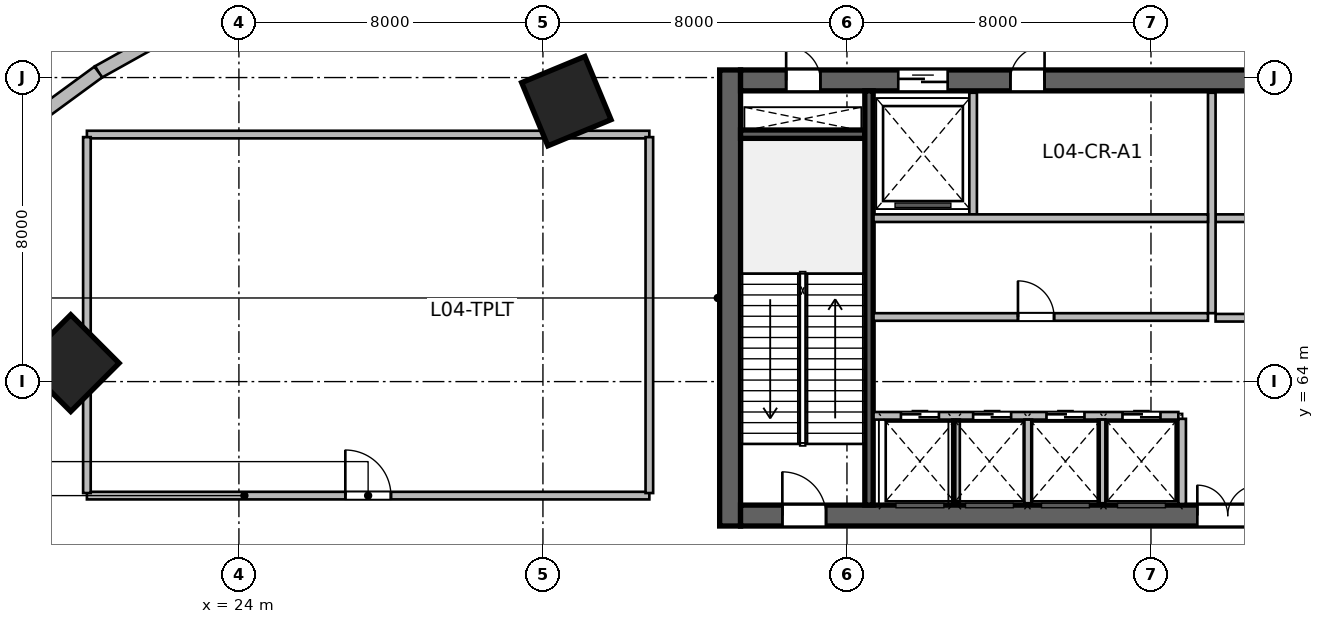
"""IFC4 building model, lengths in metres.
Left out: names, types, materials, properties, quantities, classifications, styles, units other than length and angle.
Written with IfcOpenShell. Run it as: python <this file> out.ifc"""

import sys

from ifc_helpers import new_model, si_unit, direction, frame, frame_2d, origin, origin_2d, place, context, subcontext, project, spatial, rectangle, extrude, source, transform, mapped, element, fill, save


model = new_model("IFC4")
c1 = context("Model", 3, precision=1e-05, world=origin(), true_north=direction((0.0, 1.0)))
c2 = subcontext(c1, "Body", "Model", "MODEL_VIEW")
j1 = project(units=[si_unit("LENGTHUNIT", "METRE"), si_unit("PLANEANGLEUNIT", "RADIAN")], contexts=[c1])
p1 = place(None, origin())
s1 = spatial("IfcSite", under=j1, at=p1, CompositionType="ELEMENT")
p2 = place(p1, origin())
s2 = spatial("IfcBuilding", under=s1, at=p2, CompositionType="ELEMENT")
p3 = place(p2, frame((0.0, 0.0, 24.0)))
s3 = spatial("IfcBuildingStorey", under=s2, at=p3, CompositionType="ELEMENT", Elevation=24.0)
m1 = source(origin(), c2, "Body", "SweptSolid", [
    extrude(rectangle(XDim=12.0, YDim=0.55, at=frame_2d((6.0, 0.0))), origin(), (0.0, 0.0, 1.0), 6.0),
])
p4 = place(p3, frame((36.925, 60.2, 0.0), z_axis=(0.0, 0.0, 1.0), x_axis=(0.0, 1.0, 0.0)))
e1 = element("IfcWall", 1, at=p4, inside=s3, PredefinedType="SHEAR", context=c2, shape_type="MappedRepresentation", body=[
    mapped(m1, transform((0.0, 0.0, 0.0), scale=1.0)),
])
m2 = source(origin(), c2, "Body", "SweptSolid", [
    extrude(rectangle(XDim=21.6, YDim=0.55, at=frame_2d((10.8, 0.0))), origin(), (0.0, 0.0, 1.0), 6.0),
])
p5 = place(p3, frame((37.2, 60.475, 0.0), z_axis=(0.0, 0.0, 1.0), x_axis=(1.0, 0.0, 0.0)))
e2 = element("IfcWall", 2, at=p5, inside=s3, PredefinedType="SHEAR", context=c2, shape_type="MappedRepresentation", body=[
    mapped(m2, transform((0.0, 0.0, 0.0), scale=1.0)),
])
p6 = place(p5, frame((1.1, 0.0, 0.0)))
e3 = element("IfcOpeningElement", 3, at=p6, cuts=e2, PredefinedType="OPENING", context=c2, shape_type="SweptSolid", body=[
    extrude(rectangle(XDim=1.15, YDim=2.15, at=frame_2d((0.575, 1.075))), frame((0.0, 0.285, 0.0), z_axis=(0.0, -1.0, 0.0), x_axis=(1.0, 0.0, 0.0)), (0.0, 0.0, 1.0), 0.57),
])
p7 = place(p5, frame((19.5, 0.0, 0.0)))
e4 = element("IfcOpeningElement", 4, at=p7, cuts=e2, PredefinedType="OPENING", context=c2, shape_type="SweptSolid", body=[
    extrude(rectangle(XDim=0.9, YDim=2.1, at=frame_2d((0.45, 1.05))), frame((0.0, 0.285, 0.0), z_axis=(0.0, -1.0, 0.0), x_axis=(1.0, 0.0, 0.0)), (0.0, 0.0, 1.0), 0.57),
])
p8 = place(p5, frame((12.02, 0.0, 0.0)))
e5 = element("IfcOpeningElement", 5, at=p8, cuts=e2, PredefinedType="OPENING", context=c2, shape_type="SweptSolid", body=[
    extrude(rectangle(XDim=1.6, YDim=2.15, at=frame_2d((0.8, 1.075))), frame((0.0, 0.285, 0.0), z_axis=(0.0, -1.0, 0.0), x_axis=(1.0, 0.0, 0.0)), (0.0, 0.0, 1.0), 0.57),
])
p9 = place(p3, frame((37.2, 71.925, 0.0), z_axis=(0.0, 0.0, 1.0), x_axis=(1.0, 0.0, 0.0)))
e6 = element("IfcWall", 6, at=p9, inside=s3, PredefinedType="SHEAR", context=c2, shape_type="MappedRepresentation", body=[
    mapped(m2, transform((0.0, 0.0, 0.0), scale=1.0)),
])
p10 = place(p9, frame((1.2, 0.0, 0.0)))
e7 = element("IfcOpeningElement", 7, at=p10, cuts=e6, PredefinedType="OPENING", context=c2, shape_type="SweptSolid", body=[
    extrude(rectangle(XDim=0.9, YDim=2.1, at=frame_2d((0.45, 1.05))), frame((0.0, 0.285, 0.0), z_axis=(0.0, -1.0, 0.0), x_axis=(1.0, 0.0, 0.0)), (0.0, 0.0, 1.0), 0.57),
])
p11 = place(p9, frame((14.7, 0.0, 0.0)))
e8 = element("IfcOpeningElement", 8, at=p11, cuts=e6, PredefinedType="OPENING", context=c2, shape_type="SweptSolid", body=[
    extrude(rectangle(XDim=1.2, YDim=2.15, at=frame_2d((0.6, 1.075))), frame((0.0, 0.285, 0.0), z_axis=(0.0, -1.0, 0.0), x_axis=(1.0, 0.0, 0.0)), (0.0, 0.0, 1.0), 0.57),
])
p12 = place(p9, frame((4.15, 0.0, 0.0)))
e9 = element("IfcOpeningElement", 9, at=p12, cuts=e6, PredefinedType="OPENING", context=c2, shape_type="SweptSolid", body=[
    extrude(rectangle(XDim=1.3, YDim=2.15, at=frame_2d((0.65, 1.075))), frame((0.0, 0.285, 0.0), z_axis=(0.0, -1.0, 0.0), x_axis=(1.0, 0.0, 0.0)), (0.0, 0.0, 1.0), 0.57),
])
p13 = place(p9, frame((7.1, 0.0, 0.0)))
e10 = element("IfcOpeningElement", 10, at=p13, cuts=e6, PredefinedType="OPENING", context=c2, shape_type="SweptSolid", body=[
    extrude(rectangle(XDim=0.9, YDim=2.1, at=frame_2d((0.45, 1.05))), frame((0.0, 0.285, 0.0), z_axis=(0.0, -1.0, 0.0), x_axis=(1.0, 0.0, 0.0)), (0.0, 0.0, 1.0), 0.57),
])
m3 = source(origin(), c2, "Body", "SweptSolid", [
    extrude(rectangle(XDim=3.27, YDim=0.22, at=frame_2d((1.635, 0.0))), origin(), (0.0, 0.0, 1.0), 6.0),
])
p14 = place(p3, frame((37.2, 70.51, 0.0), z_axis=(0.0, 0.0, 1.0), x_axis=(1.0, 0.0, 0.0)))
e11 = element("IfcWall", 11, at=p14, inside=s3, PredefinedType="SHEAR", context=c2, shape_type="MappedRepresentation", body=[
    mapped(m3, transform((0.0, 0.0, 0.0), scale=1.0)),
])
m4 = source(origin(), c2, "Body", "SweptSolid", [
    extrude(rectangle(XDim=10.9, YDim=0.22, at=frame_2d((5.45, 0.0))), origin(), (0.0, 0.0, 1.0), 6.0),
])
p15 = place(p3, frame((40.58, 60.75, 0.0), z_axis=(0.0, 0.0, 1.0), x_axis=(0.0, 1.0, 0.0)))
e12 = element("IfcWall", 12, at=p15, inside=s3, PredefinedType="SHEAR", context=c2, shape_type="MappedRepresentation", body=[
    mapped(m4, transform((0.0, 0.0, 0.0), scale=1.0)),
])
m5 = source(origin(), c2, "Body", "SweptSolid", [
    extrude(rectangle(XDim=1.8, YDim=1.8, at=origin_2d()), origin(), (0.0, 0.0, 1.0), 6.0),
])
for number, where, z_axis, x_axis in (
    (13, (32.616, 71.379, 0.0), (0.0, 0.0, 1.0), (-0.383, 0.924, 0.0)),
    (14, (19.574, 64.486, 0.0), (0.0, 0.0, 1.0), (-0.707, 0.707, 0.0)),
):
    element("IfcColumn", number, at=place(p3, frame(where, z_axis=z_axis, x_axis=x_axis)), inside=s3, PredefinedType="COLUMN", context=c2, shape_type="MappedRepresentation", body=[
        mapped(m5, transform((0.0, 0.0, 0.0), scale=1.0)),
    ])
m6 = source(origin(), c2, "Body", "SweptSolid", [
    extrude(rectangle(XDim=5.667, YDim=0.35, at=frame_2d((2.833, 0.0))), origin(), (0.0, 0.0, 1.0), 5.55),
])
p16 = place(p3, frame((25.25, 74.909, 0.0), z_axis=(0.0, 0.0, 1.0), x_axis=(-0.873233089296, -0.487302751642, 0.0)))
e15 = element("IfcWall", 15, at=p16, inside=s3, PredefinedType="SOLIDWALL", context=c2, shape_type="MappedRepresentation", body=[
    mapped(m6, transform((0.0, 0.0, 0.0), scale=1.0)),
])
p17 = place(p16, frame((1.634, 0.0, 1.05)))
e16 = element("IfcOpeningElement", 16, at=p17, cuts=e15, PredefinedType="OPENING", context=c2, shape_type="SweptSolid", body=[
    extrude(rectangle(XDim=2.4, YDim=2.4, at=frame_2d((1.2, 1.2))), frame((0.0, 0.185, 0.0), z_axis=(0.0, -1.0, 0.0), x_axis=(1.0, 0.0, 0.0)), (0.0, 0.0, 1.0), 0.37),
])
m7 = source(origin(), c2, "Body", "SweptSolid", [
    extrude(rectangle(XDim=5.547, YDim=0.35, at=frame_2d((2.773, 0.0))), origin(), (0.0, 0.0, 1.0), 5.55),
])
p18 = place(p3, frame((20.302, 72.147, 0.0), z_axis=(0.0, 0.0, 1.0), x_axis=(-0.806767275837, -0.590869327887, 0.0)))
e17 = element("IfcWall", 17, at=p18, inside=s3, PredefinedType="SOLIDWALL", context=c2, shape_type="MappedRepresentation", body=[
    mapped(m7, transform((0.0, 0.0, 0.0), scale=1.0)),
])
m8 = source(origin(), c2, "Body", "SweptSolid", [
    extrude(rectangle(XDim=2.24, YDim=0.2, at=frame_2d((1.12, 0.0))), origin(), (0.0, 0.0, 1.0), 5.55),
])
p19 = place(p3, frame((48.82, 60.78, 0.0), z_axis=(0.0, 0.0, 1.0), x_axis=(0.0, 1.0, 0.0)))
e18 = element("IfcWall", 18, at=p19, inside=s3, PredefinedType="SOLIDWALL", context=c2, shape_type="MappedRepresentation", body=[
    mapped(m8, transform((0.0, 0.0, 0.0), scale=1.0)),
])
m9 = source(origin(), c2, "Body", "SweptSolid", [
    extrude(rectangle(XDim=5.62, YDim=0.2, at=frame_2d((2.81, 0.0))), origin(), (0.0, 0.0, 1.0), 5.55),
])
p20 = place(p3, frame((49.7, 68.3, 0.0), z_axis=(0.0, 0.0, 1.0), x_axis=(1.0, 0.0, 0.0)))
e19 = element("IfcWall", 19, at=p20, inside=s3, PredefinedType="SOLIDWALL", context=c2, shape_type="MappedRepresentation", body=[
    mapped(m9, transform((0.0, 0.0, 0.0), scale=1.0)),
])
p21 = place(p20, frame((1.6, 0.0, 0.0)))
e20 = element("IfcOpeningElement", 20, at=p21, cuts=e19, PredefinedType="OPENING", context=c2, shape_type="SweptSolid", body=[
    extrude(rectangle(XDim=1.1, YDim=2.15, at=frame_2d((0.55, 1.075))), frame((0.0, 0.11, 0.0), z_axis=(0.0, -1.0, 0.0), x_axis=(1.0, 0.0, 0.0)), (0.0, 0.0, 1.0), 0.22),
])
p22 = place(p20, frame((3.7, 0.0, 0.0)))
e21 = element("IfcOpeningElement", 21, at=p22, cuts=e19, PredefinedType="OPENING", context=c2, shape_type="SweptSolid", body=[
    extrude(rectangle(XDim=1.1, YDim=2.15, at=frame_2d((0.55, 1.075))), frame((0.0, 0.11, 0.0), z_axis=(0.0, -1.0, 0.0), x_axis=(1.0, 0.0, 0.0)), (0.0, 0.0, 1.0), 0.22),
])
m10 = source(origin(), c2, "Body", "SweptSolid", [
    extrude(rectangle(XDim=5.8, YDim=0.2, at=frame_2d((2.9, 0.0))), origin(), (0.0, 0.0, 1.0), 5.55),
])
p23 = place(p3, frame((49.6, 65.8, 0.0), z_axis=(0.0, 0.0, 1.0), x_axis=(0.0, 1.0, 0.0)))
e22 = element("IfcWall", 22, at=p23, inside=s3, PredefinedType="SOLIDWALL", context=c2, shape_type="MappedRepresentation", body=[
    mapped(m10, transform((0.0, 0.0, 0.0), scale=1.0)),
])
p24 = place(p3, frame((49.7, 65.68, 0.0), z_axis=(0.0, 0.0, 1.0), x_axis=(1.0, 0.0, 0.0)))
e23 = element("IfcWall", 23, at=p24, inside=s3, PredefinedType="SOLIDWALL", context=c2, shape_type="MappedRepresentation", body=[
    mapped(m9, transform((0.0, 0.0, 0.0), scale=1.0)),
])
m11 = source(origin(), c2, "Body", "SweptSolid", [
    extrude(rectangle(XDim=3.2, YDim=0.2, at=frame_2d((1.6, 0.0))), origin(), (0.0, 0.0, 1.0), 5.55),
])
p25 = place(p3, frame((43.32, 68.4, 0.0), z_axis=(0.0, 0.0, 1.0), x_axis=(0.0, 1.0, 0.0)))
e24 = element("IfcWall", 24, at=p25, inside=s3, PredefinedType="SOLIDWALL", context=c2, shape_type="MappedRepresentation", body=[
    mapped(m11, transform((0.0, 0.0, 0.0), scale=1.0)),
])
m12 = source(origin(), c2, "Body", "SweptSolid", [
    extrude(rectangle(XDim=8.8, YDim=0.2, at=frame_2d((4.4, 0.0))), origin(), (0.0, 0.0, 1.0), 5.55),
])
p26 = place(p3, frame((40.7, 68.3, 0.0), z_axis=(0.0, 0.0, 1.0), x_axis=(1.0, 0.0, 0.0)))
e25 = element("IfcWall", 25, at=p26, inside=s3, PredefinedType="SOLIDWALL", context=c2, shape_type="MappedRepresentation", body=[
    mapped(m12, transform((0.0, 0.0, 0.0), scale=1.0)),
])
m13 = source(origin(), c2, "Body", "SweptSolid", [
    extrude(rectangle(XDim=8.02, YDim=0.2, at=frame_2d((4.01, 0.0))), origin(), (0.0, 0.0, 1.0), 5.55),
])
p27 = place(p3, frame((40.7, 63.1, 0.0), z_axis=(0.0, 0.0, 1.0), x_axis=(1.0, 0.0, 0.0)))
e26 = element("IfcWall", 26, at=p27, inside=s3, PredefinedType="SOLIDWALL", context=c2, shape_type="MappedRepresentation", body=[
    mapped(m13, transform((0.0, 0.0, 0.0), scale=1.0)),
])
p28 = place(p27, frame((0.72, 0.0, 0.0)))
e27 = element("IfcOpeningElement", 27, at=p28, cuts=e26, PredefinedType="OPENING", context=c2, shape_type="SweptSolid", body=[
    extrude(rectangle(XDim=1.0, YDim=2.15, at=frame_2d((0.5, 1.075))), frame((0.0, 0.11, 0.0), z_axis=(0.0, -1.0, 0.0), x_axis=(1.0, 0.0, 0.0)), (0.0, 0.0, 1.0), 0.22),
])
p29 = place(p27, frame((2.62, 0.0, 0.0)))
e28 = element("IfcOpeningElement", 28, at=p29, cuts=e26, PredefinedType="OPENING", context=c2, shape_type="SweptSolid", body=[
    extrude(rectangle(XDim=1.0, YDim=2.15, at=frame_2d((0.5, 1.075))), frame((0.0, 0.11, 0.0), z_axis=(0.0, -1.0, 0.0), x_axis=(1.0, 0.0, 0.0)), (0.0, 0.0, 1.0), 0.22),
])
p30 = place(p27, frame((4.55, 0.0, 0.0)))
e29 = element("IfcOpeningElement", 29, at=p30, cuts=e26, PredefinedType="OPENING", context=c2, shape_type="SweptSolid", body=[
    extrude(rectangle(XDim=1.0, YDim=2.15, at=frame_2d((0.5, 1.075))), frame((0.0, 0.11, 0.0), z_axis=(0.0, -1.0, 0.0), x_axis=(1.0, 0.0, 0.0)), (0.0, 0.0, 1.0), 0.22),
])
p31 = place(p27, frame((6.55, 0.0, 0.0)))
e30 = element("IfcOpeningElement", 30, at=p31, cuts=e26, PredefinedType="OPENING", context=c2, shape_type="SweptSolid", body=[
    extrude(rectangle(XDim=1.0, YDim=2.15, at=frame_2d((0.5, 1.075))), frame((0.0, 0.11, 0.0), z_axis=(0.0, -1.0, 0.0), x_axis=(1.0, 0.0, 0.0)), (0.0, 0.0, 1.0), 0.22),
])
m14 = source(origin(), c2, "Body", "SweptSolid", [
    extrude(rectangle(XDim=2.2, YDim=0.2, at=frame_2d((1.1, 0.0))), origin(), (0.0, 0.0, 1.0), 5.55),
])
for number, where, z_axis, x_axis in (
    (31, (42.87, 60.8, 0.0), (0.0, 0.0, 1.0), (0.0, 1.0, 0.0)),
    (32, (44.77, 60.8, 0.0), (0.0, 0.0, 1.0), (0.0, 1.0, 0.0)),
    (33, (46.7, 60.8, 0.0), (0.0, 0.0, 1.0), (0.0, 1.0, 0.0)),
):
    element("IfcWall", number, at=place(p3, frame(where, z_axis=z_axis, x_axis=x_axis)), inside=s3, PredefinedType="SOLIDWALL", context=c2, shape_type="MappedRepresentation", body=[
        mapped(m14, transform((0.0, 0.0, 0.0), scale=1.0)),
    ])
p32 = place(p3, frame((40.7, 65.7, 0.0), z_axis=(0.0, 0.0, 1.0), x_axis=(1.0, 0.0, 0.0)))
e34 = element("IfcWall", 34, at=p32, inside=s3, PredefinedType="SOLIDWALL", context=c2, shape_type="MappedRepresentation", body=[
    mapped(m12, transform((0.0, 0.0, 0.0), scale=1.0)),
])
p33 = place(p32, frame((3.8, 0.0, 0.0)))
e35 = element("IfcOpeningElement", 35, at=p33, cuts=e34, PredefinedType="OPENING", context=c2, shape_type="SweptSolid", body=[
    extrude(rectangle(XDim=0.95, YDim=2.15, at=frame_2d((0.475, 1.075))), frame((0.0, 0.11, 0.0), z_axis=(0.0, -1.0, 0.0), x_axis=(1.0, 0.0, 0.0)), (0.0, 0.0, 1.0), 0.22),
])
m15 = source(origin(), c2, "Body", "SweptSolid", [
    extrude(rectangle(XDim=14.8, YDim=0.2, at=frame_2d((7.4, 0.0))), origin(), (0.0, 0.0, 1.0), 5.55),
])
p34 = place(p3, frame((20.0, 61.0, 0.0), z_axis=(0.0, 0.0, 1.0), x_axis=(1.0, 0.0, 0.0)))
e36 = element("IfcWall", 36, at=p34, inside=s3, PredefinedType="SOLIDWALL", context=c2, shape_type="MappedRepresentation", body=[
    mapped(m15, transform((0.0, 0.0, 0.0), scale=1.0)),
])
p35 = place(p34, frame((6.8, 0.0, 0.0)))
e37 = element("IfcOpeningElement", 37, at=p35, cuts=e36, PredefinedType="OPENING", context=c2, shape_type="SweptSolid", body=[
    extrude(rectangle(XDim=1.2, YDim=2.15, at=frame_2d((0.6, 1.075))), frame((0.0, 0.11, 0.0), z_axis=(0.0, -1.0, 0.0), x_axis=(1.0, 0.0, 0.0)), (0.0, 0.0, 1.0), 0.22),
])
m16 = source(origin(), c2, "Body", "SweptSolid", [
    extrude(rectangle(XDim=14.8, YDim=0.2, at=frame_2d((7.4, 0.0))), origin(), (0.0, 0.0, 1.0), 4.593),
])
p36 = place(p3, frame((20.0, 70.5, 0.0), z_axis=(0.0, 0.0, 1.0), x_axis=(1.0, 0.0, 0.0)))
e38 = element("IfcWall", 38, at=p36, inside=s3, PredefinedType="SOLIDWALL", context=c2, shape_type="MappedRepresentation", body=[
    mapped(m16, transform((0.0, 0.0, 0.0), scale=1.0)),
])
m17 = source(origin(), c2, "Body", "SweptSolid", [
    extrude(rectangle(XDim=9.365, YDim=0.2, at=frame_2d((4.683, 0.0))), origin(), (0.0, 0.0, 1.0), 2.66),
])
p37 = place(p3, frame((20.0, 61.067, 0.0), z_axis=(0.0, 0.0, 1.0), x_axis=(0.0, 1.0, 0.0)))
e39 = element("IfcWall", 39, at=p37, inside=s3, PredefinedType="SOLIDWALL", context=c2, shape_type="MappedRepresentation", body=[
    mapped(m17, transform((0.0, 0.0, 0.0), scale=1.0)),
])
m18 = source(origin(), c2, "Body", "SweptSolid", [
    extrude(rectangle(XDim=9.365, YDim=0.2, at=frame_2d((4.683, 0.0))), origin(), (0.0, 0.0, 1.0), 5.55),
])
p38 = place(p3, frame((34.8, 61.067, 0.0), z_axis=(0.0, 0.0, 1.0), x_axis=(0.0, 1.0, 0.0)))
e40 = element("IfcWall", 40, at=p38, inside=s3, PredefinedType="SOLIDWALL", context=c2, shape_type="MappedRepresentation", body=[
    mapped(m18, transform((0.0, 0.0, 0.0), scale=1.0)),
])
m19 = source(origin(), c2, "Body", "SweptSolid", [
    extrude(rectangle(XDim=1.15, YDim=2.15, at=frame_2d((0.575, 1.075))), frame((0.0, 0.025, 0.0), z_axis=(0.0, -1.0, 0.0), x_axis=(1.0, 0.0, 0.0)), (0.0, 0.0, 1.0), 0.05),
])
p39 = place(p6, origin())
e41 = element("IfcDoor", 41, at=p39, inside=s3, OperationType="SINGLE_SWING_LEFT", PredefinedType="DOOR", context=c2, shape_type="MappedRepresentation", body=[
    mapped(m19, transform((0.0, 0.0, 0.0), scale=1.0)),
])
fill(e3, e41)
m20 = source(origin(), c2, "Body", "SweptSolid", [
    extrude(rectangle(XDim=0.9, YDim=2.1, at=frame_2d((0.45, 1.05))), frame((0.0, 0.025, 0.0), z_axis=(0.0, -1.0, 0.0), x_axis=(1.0, 0.0, 0.0)), (0.0, 0.0, 1.0), 0.05),
])
p40 = place(p10, origin())
e42 = element("IfcDoor", 42, at=p40, inside=s3, OperationType="SINGLE_SWING_LEFT", PredefinedType="DOOR", context=c2, shape_type="MappedRepresentation", body=[
    mapped(m20, transform((0.0, 0.0, 0.0), scale=1.0)),
])
fill(e7, e42)
m21 = source(origin(), c2, "Body", "SweptSolid", [
    extrude(rectangle(XDim=1.6, YDim=2.15, at=frame_2d((0.8, 1.075))), frame((0.0, 0.025, 0.0), z_axis=(0.0, -1.0, 0.0), x_axis=(1.0, 0.0, 0.0)), (0.0, 0.0, 1.0), 0.05),
])
p41 = place(p8, origin())
e43 = element("IfcDoor", 43, at=p41, inside=s3, OperationType="DOUBLE_DOOR_SINGLE_SWING", PredefinedType="DOOR", context=c2, shape_type="MappedRepresentation", body=[
    mapped(m21, transform((0.0, 0.0, 0.0), scale=1.0)),
])
fill(e5, e43)
m22 = source(origin(), c2, "Body", "SweptSolid", [
    extrude(rectangle(XDim=1.3, YDim=2.15, at=frame_2d((0.65, 1.075))), frame((0.0, 0.025, 0.0), z_axis=(0.0, -1.0, 0.0), x_axis=(1.0, 0.0, 0.0)), (0.0, 0.0, 1.0), 0.05),
])
p42 = place(p12, origin())
e44 = element("IfcDoor", 44, at=p42, inside=s3, OperationType="DOUBLE_DOOR_SLIDING", PredefinedType="DOOR", context=c2, shape_type="MappedRepresentation", body=[
    mapped(m22, transform((0.0, 0.0, 0.0), scale=1.0)),
])
fill(e9, e44)
p43 = place(p13, origin())
e45 = element("IfcDoor", 45, at=p43, inside=s3, OperationType="SINGLE_SWING_RIGHT", PredefinedType="DOOR", context=c2, shape_type="MappedRepresentation", body=[
    mapped(m20, transform((0.0, 0.0, 0.0), scale=1.0)),
])
fill(e10, e45)
m23 = source(origin(), c2, "Body", "SweptSolid", [
    extrude(rectangle(XDim=1.0, YDim=2.15, at=frame_2d((0.5, 1.075))), frame((0.0, 0.025, 0.0), z_axis=(0.0, -1.0, 0.0), x_axis=(1.0, 0.0, 0.0)), (0.0, 0.0, 1.0), 0.05),
])
p44 = place(p28, origin())
e46 = element("IfcDoor", 46, at=p44, inside=s3, OperationType="DOUBLE_DOOR_SLIDING", PredefinedType="DOOR", context=c2, shape_type="MappedRepresentation", body=[
    mapped(m23, transform((0.0, 0.0, 0.0), scale=1.0)),
])
fill(e27, e46)
p45 = place(p29, origin())
e47 = element("IfcDoor", 47, at=p45, inside=s3, OperationType="DOUBLE_DOOR_SLIDING", PredefinedType="DOOR", context=c2, shape_type="MappedRepresentation", body=[
    mapped(m23, transform((0.0, 0.0, 0.0), scale=1.0)),
])
fill(e28, e47)
p46 = place(p30, origin())
e48 = element("IfcDoor", 48, at=p46, inside=s3, OperationType="DOUBLE_DOOR_SLIDING", PredefinedType="DOOR", context=c2, shape_type="MappedRepresentation", body=[
    mapped(m23, transform((0.0, 0.0, 0.0), scale=1.0)),
])
fill(e29, e48)
p47 = place(p31, origin())
e49 = element("IfcDoor", 49, at=p47, inside=s3, OperationType="DOUBLE_DOOR_SLIDING", PredefinedType="DOOR", context=c2, shape_type="MappedRepresentation", body=[
    mapped(m23, transform((0.0, 0.0, 0.0), scale=1.0)),
])
fill(e30, e49)
m24 = source(origin(), c2, "Body", "SweptSolid", [
    extrude(rectangle(XDim=0.95, YDim=2.15, at=frame_2d((0.475, 1.075))), frame((0.0, 0.025, 0.0), z_axis=(0.0, -1.0, 0.0), x_axis=(1.0, 0.0, 0.0)), (0.0, 0.0, 1.0), 0.05),
])
p48 = place(p33, origin())
e50 = element("IfcDoor", 50, at=p48, inside=s3, OperationType="SINGLE_SWING_LEFT", PredefinedType="DOOR", context=c2, shape_type="MappedRepresentation", body=[
    mapped(m24, transform((0.0, 0.0, 0.0), scale=1.0)),
])
fill(e35, e50)
m25 = source(origin(), c2, "Body", "SweptSolid", [
    extrude(rectangle(XDim=1.2, YDim=2.15, at=frame_2d((0.6, 1.075))), frame((0.0, 0.025, 0.0), z_axis=(0.0, -1.0, 0.0), x_axis=(1.0, 0.0, 0.0)), (0.0, 0.0, 1.0), 0.05),
])
p49 = place(p35, origin())
e51 = element("IfcDoor", 51, at=p49, inside=s3, OperationType="SINGLE_SWING_LEFT", PredefinedType="DOOR", context=c2, shape_type="MappedRepresentation", body=[
    mapped(m25, transform((0.0, 0.0, 0.0), scale=1.0)),
])
fill(e37, e51)
save(model, sys.argv[1])
